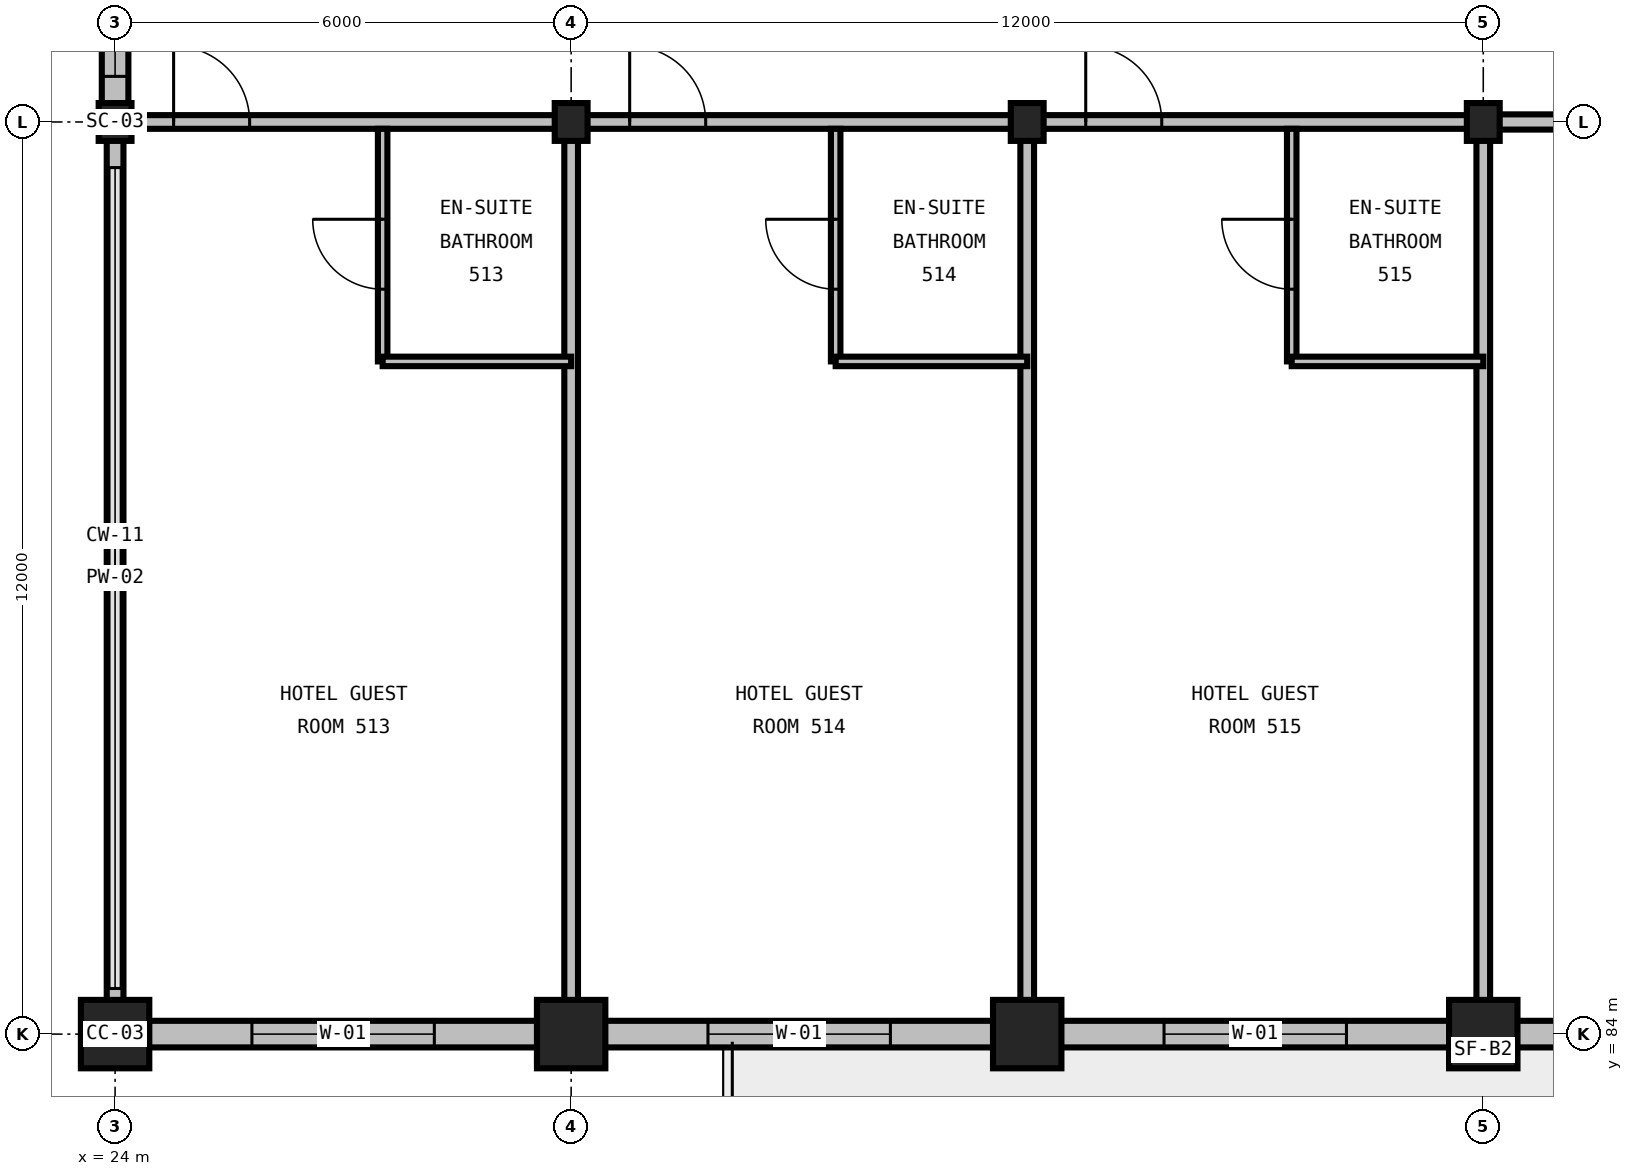
"""IFC4 building model, lengths in metres.
Left out: names, types, materials, properties, quantities, classifications, styles, units other than length and angle.
Written with IfcOpenShell. Run it as: python <this file> out.ifc"""

import sys

from ifc_helpers import new_model, si_unit, direction, frame, frame_2d, origin, origin_2d, place, context, subcontext, project, spatial, rectangle, i_section, extrude, element, fill, save


model = new_model("IFC4")
c1 = context("Model", 3, precision=1e-05, world=origin(), true_north=direction((0.0, 1.0)))
c2 = subcontext(c1, "Body", "Model", "MODEL_VIEW")
j1 = project(units=[si_unit("LENGTHUNIT", "METRE"), si_unit("PLANEANGLEUNIT", "RADIAN")], contexts=[c1])
p1 = place(None, origin())
s1 = spatial("IfcSite", under=j1, at=p1, CompositionType="ELEMENT")
p2 = place(p1, origin())
s2 = spatial("IfcBuilding", under=s1, at=p2, CompositionType="ELEMENT")
p3 = place(p2, frame((0.0, 0.0, 27.6)))
s3 = spatial("IfcBuildingStorey", under=s2, at=p3, CompositionType="ELEMENT", Elevation=27.6)
p4 = place(p3, frame((24.0, 84.0, 0.0), z_axis=(0.0, 0.0, 1.0), x_axis=(1.0, 0.0, 0.0)))
e1 = element("IfcColumn", 1, at=p4, inside=s3, PredefinedType="COLUMN", context=c2, shape_type="SweptSolid", body=[
    extrude(rectangle(XDim=0.9, YDim=0.9, at=origin_2d()), origin(), (0.0, 0.0, 1.0), 3.6),
])
p5 = place(p3, frame((24.0, 96.0, 0.0), z_axis=(0.0, 0.0, 1.0), x_axis=(1.0, 0.0, 0.0)))
e2 = element("IfcColumn", 2, at=p5, inside=s3, PredefinedType="COLUMN", context=c2, shape_type="SweptSolid", body=[
    extrude(i_section(OverallWidth=0.432, OverallDepth=0.498, WebThickness=0.056, FlangeThickness=0.089, FilletRadius=0.031, at=origin_2d()), origin(), (0.0, 0.0, 1.0), 3.6),
])
p6 = place(p3, frame((30.0, 84.0, 0.0), z_axis=(0.0, 0.0, 1.0), x_axis=(1.0, 0.0, 0.0)))
e3 = element("IfcColumn", 3, at=p6, inside=s3, PredefinedType="COLUMN", context=c2, shape_type="SweptSolid", body=[
    extrude(rectangle(XDim=0.9, YDim=0.9, at=origin_2d()), origin(), (0.0, 0.0, 1.0), 3.6),
])
p7 = place(p3, frame((30.0, 96.0, 0.0), z_axis=(0.0, 0.0, 1.0), x_axis=(1.0, 0.0, 0.0)))
e4 = element("IfcColumn", 4, at=p7, inside=s3, PredefinedType="COLUMN", context=c2, shape_type="SweptSolid", body=[
    extrude(i_section(OverallWidth=0.432, OverallDepth=0.498, WebThickness=0.056, FlangeThickness=0.089, FilletRadius=0.031, at=origin_2d()), origin(), (0.0, 0.0, 1.0), 3.6),
])
p8 = place(p3, frame((36.0, 84.0, 0.0), z_axis=(0.0, 0.0, 1.0), x_axis=(1.0, 0.0, 0.0)))
e5 = element("IfcColumn", 5, at=p8, inside=s3, PredefinedType="COLUMN", context=c2, shape_type="SweptSolid", body=[
    extrude(rectangle(XDim=0.9, YDim=0.9, at=origin_2d()), origin(), (0.0, 0.0, 1.0), 3.6),
])
p9 = place(p3, frame((36.0, 96.0, 0.0), z_axis=(0.0, 0.0, 1.0), x_axis=(1.0, 0.0, 0.0)))
e6 = element("IfcColumn", 6, at=p9, inside=s3, PredefinedType="COLUMN", context=c2, shape_type="SweptSolid", body=[
    extrude(i_section(OverallWidth=0.432, OverallDepth=0.498, WebThickness=0.056, FlangeThickness=0.089, FilletRadius=0.031, at=origin_2d()), origin(), (0.0, 0.0, 1.0), 3.6),
])
p10 = place(p3, frame((42.0, 84.0, 0.0), z_axis=(0.0, 0.0, 1.0), x_axis=(1.0, 0.0, 0.0)))
e7 = element("IfcColumn", 7, at=p10, inside=s3, PredefinedType="COLUMN", context=c2, shape_type="SweptSolid", body=[
    extrude(rectangle(XDim=0.9, YDim=0.9, at=origin_2d()), origin(), (0.0, 0.0, 1.0), 3.6),
])
p11 = place(p3, frame((42.0, 96.0, 0.0), z_axis=(0.0, 0.0, 1.0), x_axis=(1.0, 0.0, 0.0)))
e8 = element("IfcColumn", 8, at=p11, inside=s3, PredefinedType="COLUMN", context=c2, shape_type="SweptSolid", body=[
    extrude(i_section(OverallWidth=0.432, OverallDepth=0.498, WebThickness=0.056, FlangeThickness=0.089, FilletRadius=0.031, at=origin_2d()), origin(), (0.0, 0.0, 1.0), 3.6),
])
p12 = place(p3, frame((24.0, 84.0, 0.0), z_axis=(0.0, 0.0, 1.0), x_axis=(1.0, 0.0, 0.0)))
e9 = element("IfcWall", 9, at=p12, inside=s3, PredefinedType="STANDARD", context=c2, shape_type="SweptSolid", body=[
    extrude(rectangle(XDim=6.0, YDim=0.35, at=frame_2d((3.0, 0.0))), origin(), (0.0, 0.0, 1.0), 2.486),
])
p13 = place(p12, frame((1.8, 0.0, 0.75)))
e10 = element("IfcOpeningElement", 10, at=p13, cuts=e9, PredefinedType="OPENING", context=c2, shape_type="SweptSolid", body=[
    extrude(rectangle(XDim=2.4, YDim=1.65, at=frame_2d((1.2, 0.825))), frame((0.0, 0.19, 0.0), z_axis=(0.0, -1.0, 0.0), x_axis=(1.0, 0.0, 0.0)), (0.0, 0.0, 1.0), 0.38),
])
p14 = place(p3, frame((30.0, 84.0, 0.0), z_axis=(0.0, 0.0, 1.0), x_axis=(1.0, 0.0, 0.0)))
e11 = element("IfcWall", 11, at=p14, inside=s3, PredefinedType="STANDARD", context=c2, shape_type="SweptSolid", body=[
    extrude(rectangle(XDim=6.0, YDim=0.35, at=frame_2d((3.0, 0.0))), origin(), (0.0, 0.0, 1.0), 2.486),
])
p15 = place(p14, frame((1.8, 0.0, 0.75)))
e12 = element("IfcOpeningElement", 12, at=p15, cuts=e11, PredefinedType="OPENING", context=c2, shape_type="SweptSolid", body=[
    extrude(rectangle(XDim=2.4, YDim=1.65, at=frame_2d((1.2, 0.825))), frame((0.0, 0.19, 0.0), z_axis=(0.0, -1.0, 0.0), x_axis=(1.0, 0.0, 0.0)), (0.0, 0.0, 1.0), 0.38),
])
p16 = place(p3, frame((36.0, 84.0, 0.0), z_axis=(0.0, 0.0, 1.0), x_axis=(1.0, 0.0, 0.0)))
e13 = element("IfcWall", 13, at=p16, inside=s3, PredefinedType="STANDARD", context=c2, shape_type="SweptSolid", body=[
    extrude(rectangle(XDim=6.0, YDim=0.35, at=frame_2d((3.0, 0.0))), origin(), (0.0, 0.0, 1.0), 2.486),
])
p17 = place(p16, frame((1.8, 0.0, 0.75)))
e14 = element("IfcOpeningElement", 14, at=p17, cuts=e13, PredefinedType="OPENING", context=c2, shape_type="SweptSolid", body=[
    extrude(rectangle(XDim=2.4, YDim=1.65, at=frame_2d((1.2, 0.825))), frame((0.0, 0.19, 0.0), z_axis=(0.0, -1.0, 0.0), x_axis=(1.0, 0.0, 0.0)), (0.0, 0.0, 1.0), 0.38),
])
p18 = place(p3, frame((42.0, 84.0, 0.0), z_axis=(0.0, 0.0, 1.0), x_axis=(1.0, 0.0, 0.0)))
e15 = element("IfcWall", 15, at=p18, inside=s3, PredefinedType="STANDARD", context=c2, shape_type="SweptSolid", body=[
    extrude(rectangle(XDim=12.0, YDim=0.35, at=frame_2d((6.0, 0.0))), origin(), (0.0, 0.0, 1.0), 2.486),
])
p19 = place(p18, frame((2.1, 0.0, 0.0)))
e16 = element("IfcOpeningElement", 16, at=p19, cuts=e15, PredefinedType="OPENING", context=c2, shape_type="SweptSolid", body=[
    extrude(rectangle(XDim=1.8, YDim=2.2, at=frame_2d((0.9, 1.1))), frame((0.0, 0.19, 0.0), z_axis=(0.0, -1.0, 0.0), x_axis=(1.0, 0.0, 0.0)), (0.0, 0.0, 1.0), 0.38),
])
p20 = place(p18, frame((7.725, 0.0, 0.75)))
e17 = element("IfcOpeningElement", 17, at=p20, cuts=e15, PredefinedType="OPENING", context=c2, shape_type="SweptSolid", body=[
    extrude(rectangle(XDim=2.55, YDim=1.65, at=frame_2d((1.275, 0.825))), frame((0.0, 0.19, 0.0), z_axis=(0.0, -1.0, 0.0), x_axis=(1.0, 0.0, 0.0)), (0.0, 0.0, 1.0), 0.38),
])
p21 = place(p3, frame((24.0, 96.0, 0.0), z_axis=(0.0, 0.0, 1.0), x_axis=(0.0, -1.0, 0.0)))
e18 = element("IfcWall", 18, at=p21, inside=s3, PredefinedType="PARAPET", context=c2, shape_type="SweptSolid", body=[
    extrude(rectangle(XDim=12.0, YDim=0.22, at=frame_2d((6.0, 0.0))), origin(), (0.0, 0.0, 1.0), 0.2),
])
p22 = place(p3, frame((24.0, 105.0, 0.0), z_axis=(0.0, 0.0, 1.0), x_axis=(0.0, -1.0, 0.0)))
e19 = element("IfcWall", 19, at=p22, inside=s3, PredefinedType="STANDARD", context=c2, shape_type="SweptSolid", body=[
    extrude(rectangle(XDim=9.0, YDim=0.35, at=frame_2d((4.5, 0.0))), origin(), (0.0, 0.0, 1.0), 2.981),
])
p23 = place(p22, frame((6.6, 0.0, 0.85)))
e20 = element("IfcOpeningElement", 20, at=p23, cuts=e19, PredefinedType="OPENING", context=c2, shape_type="SweptSolid", body=[
    extrude(rectangle(XDim=1.8, YDim=1.5, at=frame_2d((0.9, 0.75))), frame((0.0, 0.19, 0.0), z_axis=(0.0, -1.0, 0.0), x_axis=(1.0, 0.0, 0.0)), (0.0, 0.0, 1.0), 0.38),
])
p24 = place(p3, frame((42.0, 96.0, 0.0), z_axis=(0.0, 0.0, 1.0), x_axis=(1.0, 0.0, 0.0)))
e21 = element("IfcWall", 21, at=p24, inside=s3, PredefinedType="PARTITIONING", context=c2, shape_type="SweptSolid", body=[
    extrude(rectangle(XDim=6.0, YDim=0.2, at=frame_2d((3.0, 0.0))), origin(), (0.0, 0.0, 1.0), 2.359),
])
p25 = place(p24, frame((2.4, 0.0, 0.0)))
e22 = element("IfcOpeningElement", 22, at=p25, cuts=e21, PredefinedType="OPENING", context=c2, shape_type="SweptSolid", body=[
    extrude(rectangle(XDim=1.8, YDim=2.3, at=frame_2d((0.9, 1.15))), frame((0.0, 0.115, 0.0), z_axis=(0.0, -1.0, 0.0), x_axis=(1.0, 0.0, 0.0)), (0.0, 0.0, 1.0), 0.23),
])
p26 = place(p3, frame((42.0, 84.175, 0.0), z_axis=(0.0, 0.0, 1.0), x_axis=(0.0, 1.0, 0.0)))
e23 = element("IfcWall", 23, at=p26, inside=s3, PredefinedType="PARTITIONING", context=c2, shape_type="SweptSolid", body=[
    extrude(rectangle(XDim=11.825, YDim=0.18, at=frame_2d((5.913, 0.0))), origin(), (0.0, 0.0, 1.0), 2.59),
])
p27 = place(p3, frame((24.085, 96.0, 0.0), z_axis=(0.0, 0.0, 1.0), x_axis=(1.0, 0.0, 0.0)))
e24 = element("IfcWall", 24, at=p27, inside=s3, PredefinedType="PARTITIONING", context=c2, shape_type="SweptSolid", body=[
    extrude(rectangle(XDim=5.915, YDim=0.18, at=frame_2d((2.957, 0.0))), origin(), (0.0, 0.0, 1.0), 2.736),
])
p28 = place(p27, frame((0.685, 0.0, 0.0)))
e25 = element("IfcOpeningElement", 25, at=p28, cuts=e24, PredefinedType="OPENING", context=c2, shape_type="SweptSolid", body=[
    extrude(rectangle(XDim=1.0, YDim=2.15, at=frame_2d((0.5, 1.075))), frame((0.0, 0.105, 0.0), z_axis=(0.0, -1.0, 0.0), x_axis=(1.0, 0.0, 0.0)), (0.0, 0.0, 1.0), 0.21),
])
p29 = place(p3, frame((30.0, 84.175, 0.0), z_axis=(0.0, 0.0, 1.0), x_axis=(0.0, 1.0, 0.0)))
e26 = element("IfcWall", 26, at=p29, inside=s3, PredefinedType="PARTITIONING", context=c2, shape_type="SweptSolid", body=[
    extrude(rectangle(XDim=11.825, YDim=0.18, at=frame_2d((5.913, 0.0))), origin(), (0.0, 0.0, 1.0), 2.59),
])
p30 = place(p3, frame((27.52, 92.85, 0.0), z_axis=(0.0, 0.0, 1.0), x_axis=(0.0, 1.0, 0.0)))
e27 = element("IfcWall", 27, at=p30, inside=s3, PredefinedType="PARTITIONING", context=c2, shape_type="SweptSolid", body=[
    extrude(rectangle(XDim=3.06, YDim=0.125, at=frame_2d((1.53, 0.0))), origin(), (0.0, 0.0, 1.0), 3.29),
])
p31 = place(p30, frame((0.95, 0.0, 0.0)))
e28 = element("IfcOpeningElement", 28, at=p31, cuts=e27, PredefinedType="OPENING", context=c2, shape_type="SweptSolid", body=[
    extrude(rectangle(XDim=0.92, YDim=2.1, at=frame_2d((0.46, 1.05))), frame((0.0, 0.077, 0.0), z_axis=(0.0, -1.0, 0.0), x_axis=(1.0, 0.0, 0.0)), (0.0, 0.0, 1.0), 0.155),
])
p32 = place(p3, frame((27.52, 92.85, 0.0), z_axis=(0.0, 0.0, 1.0), x_axis=(1.0, 0.0, 0.0)))
e29 = element("IfcWall", 29, at=p32, inside=s3, PredefinedType="PARTITIONING", context=c2, shape_type="SweptSolid", body=[
    extrude(rectangle(XDim=2.48, YDim=0.125, at=frame_2d((1.24, 0.0))), origin(), (0.0, 0.0, 1.0), 3.29),
])
p33 = place(p3, frame((30.0, 96.0, 0.0), z_axis=(0.0, 0.0, 1.0), x_axis=(1.0, 0.0, 0.0)))
e30 = element("IfcWall", 30, at=p33, inside=s3, PredefinedType="PARTITIONING", context=c2, shape_type="SweptSolid", body=[
    extrude(rectangle(XDim=6.0, YDim=0.18, at=frame_2d((3.0, 0.0))), origin(), (0.0, 0.0, 1.0), 2.736),
])
p34 = place(p33, frame((0.77, 0.0, 0.0)))
e31 = element("IfcOpeningElement", 31, at=p34, cuts=e30, PredefinedType="OPENING", context=c2, shape_type="SweptSolid", body=[
    extrude(rectangle(XDim=1.0, YDim=2.15, at=frame_2d((0.5, 1.075))), frame((0.0, 0.105, 0.0), z_axis=(0.0, -1.0, 0.0), x_axis=(1.0, 0.0, 0.0)), (0.0, 0.0, 1.0), 0.21),
])
p35 = place(p3, frame((36.0, 84.175, 0.0), z_axis=(0.0, 0.0, 1.0), x_axis=(0.0, 1.0, 0.0)))
e32 = element("IfcWall", 32, at=p35, inside=s3, PredefinedType="PARTITIONING", context=c2, shape_type="SweptSolid", body=[
    extrude(rectangle(XDim=11.825, YDim=0.18, at=frame_2d((5.913, 0.0))), origin(), (0.0, 0.0, 1.0), 2.59),
])
p36 = place(p3, frame((33.48, 92.85, 0.0), z_axis=(0.0, 0.0, 1.0), x_axis=(0.0, 1.0, 0.0)))
e33 = element("IfcWall", 33, at=p36, inside=s3, PredefinedType="PARTITIONING", context=c2, shape_type="SweptSolid", body=[
    extrude(rectangle(XDim=3.06, YDim=0.125, at=frame_2d((1.53, 0.0))), origin(), (0.0, 0.0, 1.0), 3.29),
])
p37 = place(p36, frame((0.95, 0.0, 0.0)))
e34 = element("IfcOpeningElement", 34, at=p37, cuts=e33, PredefinedType="OPENING", context=c2, shape_type="SweptSolid", body=[
    extrude(rectangle(XDim=0.92, YDim=2.1, at=frame_2d((0.46, 1.05))), frame((0.0, 0.077, 0.0), z_axis=(0.0, -1.0, 0.0), x_axis=(1.0, 0.0, 0.0)), (0.0, 0.0, 1.0), 0.155),
])
p38 = place(p3, frame((33.48, 92.85, 0.0), z_axis=(0.0, 0.0, 1.0), x_axis=(1.0, 0.0, 0.0)))
e35 = element("IfcWall", 35, at=p38, inside=s3, PredefinedType="PARTITIONING", context=c2, shape_type="SweptSolid", body=[
    extrude(rectangle(XDim=2.52, YDim=0.125, at=frame_2d((1.26, 0.0))), origin(), (0.0, 0.0, 1.0), 3.29),
])
p39 = place(p3, frame((36.0, 96.0, 0.0), z_axis=(0.0, 0.0, 1.0), x_axis=(1.0, 0.0, 0.0)))
e36 = element("IfcWall", 36, at=p39, inside=s3, PredefinedType="PARTITIONING", context=c2, shape_type="SweptSolid", body=[
    extrude(rectangle(XDim=6.0, YDim=0.18, at=frame_2d((3.0, 0.0))), origin(), (0.0, 0.0, 1.0), 2.736),
])
p40 = place(p39, frame((0.77, 0.0, 0.0)))
e37 = element("IfcOpeningElement", 37, at=p40, cuts=e36, PredefinedType="OPENING", context=c2, shape_type="SweptSolid", body=[
    extrude(rectangle(XDim=1.0, YDim=2.15, at=frame_2d((0.5, 1.075))), frame((0.0, 0.105, 0.0), z_axis=(0.0, -1.0, 0.0), x_axis=(1.0, 0.0, 0.0)), (0.0, 0.0, 1.0), 0.21),
])
p41 = place(p3, frame((39.48, 92.85, 0.0), z_axis=(0.0, 0.0, 1.0), x_axis=(0.0, 1.0, 0.0)))
e38 = element("IfcWall", 38, at=p41, inside=s3, PredefinedType="PARTITIONING", context=c2, shape_type="SweptSolid", body=[
    extrude(rectangle(XDim=3.06, YDim=0.125, at=frame_2d((1.53, 0.0))), origin(), (0.0, 0.0, 1.0), 3.29),
])
p42 = place(p41, frame((0.95, 0.0, 0.0)))
e39 = element("IfcOpeningElement", 39, at=p42, cuts=e38, PredefinedType="OPENING", context=c2, shape_type="SweptSolid", body=[
    extrude(rectangle(XDim=0.92, YDim=2.1, at=frame_2d((0.46, 1.05))), frame((0.0, 0.077, 0.0), z_axis=(0.0, -1.0, 0.0), x_axis=(1.0, 0.0, 0.0)), (0.0, 0.0, 1.0), 0.155),
])
p43 = place(p3, frame((39.48, 92.85, 0.0), z_axis=(0.0, 0.0, 1.0), x_axis=(1.0, 0.0, 0.0)))
e40 = element("IfcWall", 40, at=p43, inside=s3, PredefinedType="PARTITIONING", context=c2, shape_type="SweptSolid", body=[
    extrude(rectangle(XDim=2.52, YDim=0.125, at=frame_2d((1.26, 0.0))), origin(), (0.0, 0.0, 1.0), 3.29),
])
p44 = place(p13, origin())
e41 = element("IfcWindow", 41, at=p44, inside=s3, PartitioningType="DOUBLE_PANEL_VERTICAL", PredefinedType="WINDOW", context=c2, shape_type="SweptSolid", body=[
    extrude(rectangle(XDim=2.4, YDim=1.65, at=frame_2d((1.2, 0.825))), frame((0.0, 0.03, 0.0), z_axis=(0.0, -1.0, 0.0), x_axis=(1.0, 0.0, 0.0)), (0.0, 0.0, 1.0), 0.06),
])
fill(e10, e41)
p45 = place(p15, origin())
e42 = element("IfcWindow", 42, at=p45, inside=s3, PartitioningType="DOUBLE_PANEL_VERTICAL", PredefinedType="WINDOW", context=c2, shape_type="SweptSolid", body=[
    extrude(rectangle(XDim=2.4, YDim=1.65, at=frame_2d((1.2, 0.825))), frame((0.0, 0.03, 0.0), z_axis=(0.0, -1.0, 0.0), x_axis=(1.0, 0.0, 0.0)), (0.0, 0.0, 1.0), 0.06),
])
fill(e12, e42)
p46 = place(p17, origin())
e43 = element("IfcWindow", 43, at=p46, inside=s3, PartitioningType="DOUBLE_PANEL_VERTICAL", PredefinedType="WINDOW", context=c2, shape_type="SweptSolid", body=[
    extrude(rectangle(XDim=2.4, YDim=1.65, at=frame_2d((1.2, 0.825))), frame((0.0, 0.03, 0.0), z_axis=(0.0, -1.0, 0.0), x_axis=(1.0, 0.0, 0.0)), (0.0, 0.0, 1.0), 0.06),
])
fill(e14, e43)
p47 = place(p23, origin())
e44 = element("IfcWindow", 44, at=p47, inside=s3, PartitioningType="SINGLE_PANEL", PredefinedType="WINDOW", context=c2, shape_type="SweptSolid", body=[
    extrude(rectangle(XDim=1.8, YDim=1.5, at=frame_2d((0.9, 0.75))), frame((0.0, 0.03, 0.0), z_axis=(0.0, -1.0, 0.0), x_axis=(1.0, 0.0, 0.0)), (0.0, 0.0, 1.0), 0.06),
])
fill(e20, e44)
p48 = place(p28, origin())
e45 = element("IfcDoor", 45, at=p48, inside=s3, OperationType="SINGLE_SWING_LEFT", PredefinedType="DOOR", context=c2, shape_type="SweptSolid", body=[
    extrude(rectangle(XDim=1.0, YDim=2.15, at=frame_2d((0.5, 1.075))), frame((0.0, 0.025, 0.0), z_axis=(0.0, -1.0, 0.0), x_axis=(1.0, 0.0, 0.0)), (0.0, 0.0, 1.0), 0.05),
])
fill(e25, e45)
p49 = place(p31, origin())
e46 = element("IfcDoor", 46, at=p49, inside=s3, OperationType="SINGLE_SWING_RIGHT", PredefinedType="DOOR", context=c2, shape_type="SweptSolid", body=[
    extrude(rectangle(XDim=0.92, YDim=2.1, at=frame_2d((0.46, 1.05))), frame((0.0, 0.025, 0.0), z_axis=(0.0, -1.0, 0.0), x_axis=(1.0, 0.0, 0.0)), (0.0, 0.0, 1.0), 0.05),
])
fill(e28, e46)
p50 = place(p34, origin())
e47 = element("IfcDoor", 47, at=p50, inside=s3, OperationType="SINGLE_SWING_LEFT", PredefinedType="DOOR", context=c2, shape_type="SweptSolid", body=[
    extrude(rectangle(XDim=1.0, YDim=2.15, at=frame_2d((0.5, 1.075))), frame((0.0, 0.025, 0.0), z_axis=(0.0, -1.0, 0.0), x_axis=(1.0, 0.0, 0.0)), (0.0, 0.0, 1.0), 0.05),
])
fill(e31, e47)
p51 = place(p37, origin())
e48 = element("IfcDoor", 48, at=p51, inside=s3, OperationType="SINGLE_SWING_RIGHT", PredefinedType="DOOR", context=c2, shape_type="SweptSolid", body=[
    extrude(rectangle(XDim=0.92, YDim=2.1, at=frame_2d((0.46, 1.05))), frame((0.0, 0.025, 0.0), z_axis=(0.0, -1.0, 0.0), x_axis=(1.0, 0.0, 0.0)), (0.0, 0.0, 1.0), 0.05),
])
fill(e34, e48)
p52 = place(p40, origin())
e49 = element("IfcDoor", 49, at=p52, inside=s3, OperationType="SINGLE_SWING_LEFT", PredefinedType="DOOR", context=c2, shape_type="SweptSolid", body=[
    extrude(rectangle(XDim=1.0, YDim=2.15, at=frame_2d((0.5, 1.075))), frame((0.0, 0.025, 0.0), z_axis=(0.0, -1.0, 0.0), x_axis=(1.0, 0.0, 0.0)), (0.0, 0.0, 1.0), 0.05),
])
fill(e37, e49)
p53 = place(p42, origin())
e50 = element("IfcDoor", 50, at=p53, inside=s3, OperationType="SINGLE_SWING_RIGHT", PredefinedType="DOOR", context=c2, shape_type="SweptSolid", body=[
    extrude(rectangle(XDim=0.92, YDim=2.1, at=frame_2d((0.46, 1.05))), frame((0.0, 0.025, 0.0), z_axis=(0.0, -1.0, 0.0), x_axis=(1.0, 0.0, 0.0)), (0.0, 0.0, 1.0), 0.05),
])
fill(e39, e50)
save(model, sys.argv[1])
